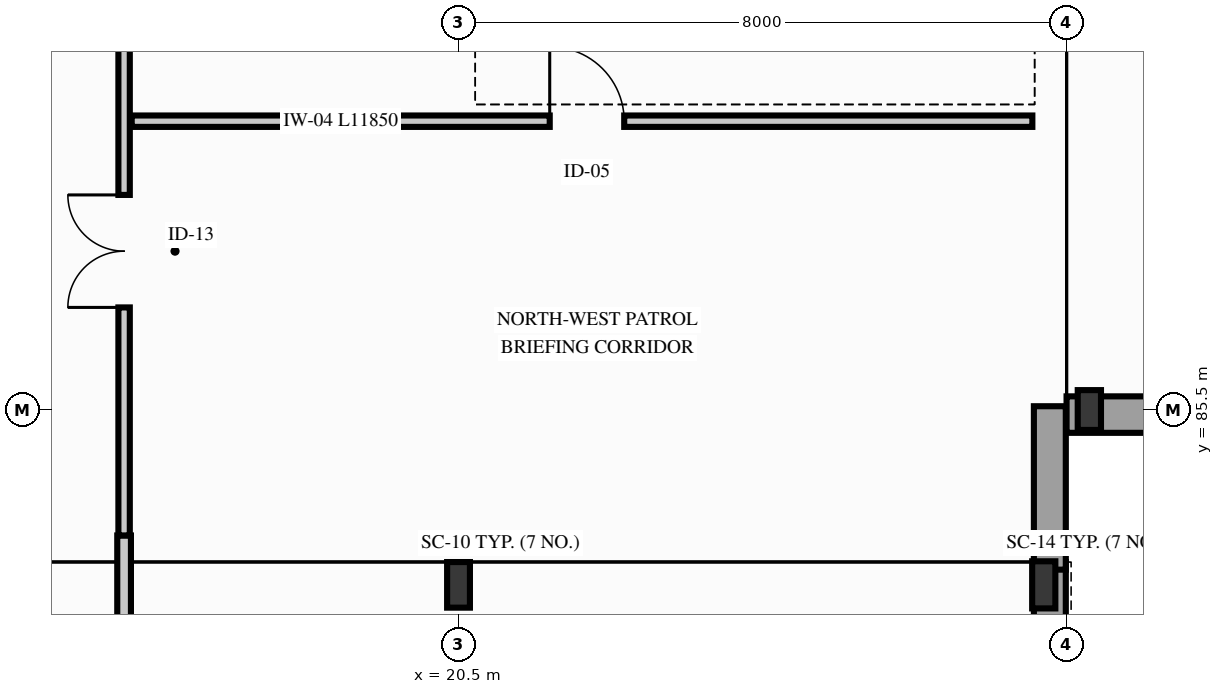
"""IFC4 building model, lengths in metres.
Left out: names, types, materials, properties, quantities, classifications, styles, units other than length and angle.
Written with IfcOpenShell. Run it as: python <this file> out.ifc"""

import sys

from ifc_helpers import new_model, si_unit, direction, frame, frame_2d, origin, origin_2d, place, context, subcontext, project, spatial, rectangle, i_section, extrude, element, fill, save


model = new_model("IFC4")
c1 = context("Model", 3, precision=1e-05, world=origin(), true_north=direction((0.0, 1.0)))
c2 = subcontext(c1, "Body", "Model", "MODEL_VIEW")
j1 = project(units=[si_unit("LENGTHUNIT", "METRE"), si_unit("PLANEANGLEUNIT", "RADIAN")], contexts=[c1])
p1 = place(None, origin())
s1 = spatial("IfcSite", under=j1, at=p1, CompositionType="ELEMENT")
p2 = place(p1, origin())
s2 = spatial("IfcBuilding", under=s1, at=p2, CompositionType="ELEMENT")
p3 = place(p2, frame((0.0, 0.0, 5.1)))
s3 = spatial("IfcBuildingStorey", under=s2, at=p3, CompositionType="ELEMENT", Elevation=5.1)
p4 = place(p3, frame((20.5, 83.2, 0.0), z_axis=(0.0, 0.0, 1.0), x_axis=(1.0, 0.0, 0.0)))
e1 = element("IfcColumn", 1, at=p4, inside=s3, PredefinedType="COLUMN", context=c2, shape_type="SweptSolid", body=[
    extrude(i_section(OverallWidth=0.3, OverallDepth=0.6, WebThickness=0.015, FlangeThickness=0.03, FilletRadius=0.027, at=origin_2d()), origin(), (0.0, 0.0, 1.0), 4.2),
])
p5 = place(p3, frame((28.2, 83.2, 0.0), z_axis=(0.0, 0.0, 1.0), x_axis=(1.0, 0.0, 0.0)))
e2 = element("IfcColumn", 2, at=p5, inside=s3, PredefinedType="COLUMN", context=c2, shape_type="SweptSolid", body=[
    extrude(i_section(OverallWidth=0.305, OverallDepth=0.62, WebThickness=0.021, FlangeThickness=0.04, FilletRadius=0.027, at=origin_2d()), origin(), (0.0, 0.0, 1.0), 4.2),
])
p6 = place(p3, frame((28.8, 85.5, 0.0), z_axis=(0.0, 0.0, 1.0), x_axis=(1.0, 0.0, 0.0)))
e3 = element("IfcColumn", 3, at=p6, inside=s3, PredefinedType="COLUMN", context=c2, shape_type="SweptSolid", body=[
    extrude(i_section(OverallWidth=0.306, OverallDepth=0.524, WebThickness=0.021, FlangeThickness=0.04, FilletRadius=0.027, at=origin_2d()), origin(), (0.0, 0.0, 1.0), 4.2),
])
p7 = place(p3, frame((28.28, 36.5, 0.0), z_axis=(0.0, 0.0, 1.0), x_axis=(0.0, 1.0, 0.0)))
e4 = element("IfcWall", 4, at=p7, inside=s3, PredefinedType="SOLIDWALL", context=c2, shape_type="SweptSolid", body=[
    extrude(rectangle(XDim=47.0, YDim=0.42, at=frame_2d((23.5, 0.0))), origin(), (0.0, 0.0, 1.0), 3.66),
])
p8 = place(p7, frame((1.65, 0.0, 0.74)))
e5 = element("IfcOpeningElement", 5, at=p8, cuts=e4, PredefinedType="OPENING", context=c2, shape_type="SweptSolid", body=[
    extrude(rectangle(XDim=1.6, YDim=2.4, at=frame_2d((0.8, 1.2))), frame((0.0, 0.22, 0.0), z_axis=(0.0, -1.0, 0.0), x_axis=(1.0, 0.0, 0.0)), (0.0, 0.0, 1.0), 0.44),
])
p9 = place(p7, frame((5.75, 0.0, 0.74)))
e6 = element("IfcOpeningElement", 6, at=p9, cuts=e4, PredefinedType="OPENING", context=c2, shape_type="SweptSolid", body=[
    extrude(rectangle(XDim=1.8, YDim=2.4, at=frame_2d((0.9, 1.2))), frame((0.0, 0.22, 0.0), z_axis=(0.0, -1.0, 0.0), x_axis=(1.0, 0.0, 0.0)), (0.0, 0.0, 1.0), 0.44),
])
p10 = place(p7, frame((9.85, 0.0, 0.84)))
e7 = element("IfcOpeningElement", 7, at=p10, cuts=e4, PredefinedType="OPENING", context=c2, shape_type="SweptSolid", body=[
    extrude(rectangle(XDim=1.5, YDim=2.3, at=frame_2d((0.75, 1.15))), frame((0.0, 0.22, 0.0), z_axis=(0.0, -1.0, 0.0), x_axis=(1.0, 0.0, 0.0)), (0.0, 0.0, 1.0), 0.44),
])
p11 = place(p7, frame((13.95, 0.0, 0.85)))
e8 = element("IfcOpeningElement", 8, at=p11, cuts=e4, PredefinedType="OPENING", context=c2, shape_type="SweptSolid", body=[
    extrude(rectangle(XDim=1.4, YDim=2.2, at=frame_2d((0.7, 1.1))), frame((0.0, 0.22, 0.0), z_axis=(0.0, -1.0, 0.0), x_axis=(1.0, 0.0, 0.0)), (0.0, 0.0, 1.0), 0.44),
])
p12 = place(p7, frame((26.25, 0.0, 0.74)))
e9 = element("IfcOpeningElement", 9, at=p12, cuts=e4, PredefinedType="OPENING", context=c2, shape_type="SweptSolid", body=[
    extrude(rectangle(XDim=1.6, YDim=2.4, at=frame_2d((0.8, 1.2))), frame((0.0, 0.22, 0.0), z_axis=(0.0, -1.0, 0.0), x_axis=(1.0, 0.0, 0.0)), (0.0, 0.0, 1.0), 0.44),
])
p13 = place(p7, frame((34.45, 0.0, 0.84)))
e10 = element("IfcOpeningElement", 10, at=p13, cuts=e4, PredefinedType="OPENING", context=c2, shape_type="SweptSolid", body=[
    extrude(rectangle(XDim=1.5, YDim=2.3, at=frame_2d((0.75, 1.15))), frame((0.0, 0.22, 0.0), z_axis=(0.0, -1.0, 0.0), x_axis=(1.0, 0.0, 0.0)), (0.0, 0.0, 1.0), 0.44),
])
p14 = place(p7, frame((42.65, 0.0, 0.54)))
e11 = element("IfcOpeningElement", 11, at=p14, cuts=e4, PredefinedType="OPENING", context=c2, shape_type="SweptSolid", body=[
    extrude(rectangle(XDim=2.2, YDim=2.6, at=frame_2d((1.1, 1.3))), frame((0.0, 0.22, 0.0), z_axis=(0.0, -1.0, 0.0), x_axis=(1.0, 0.0, 0.0)), (0.0, 0.0, 1.0), 0.44),
])
p15 = place(p3, frame((28.28, 83.4, 0.0), z_axis=(0.0, 0.0, 1.0), x_axis=(0.0, 1.0, 0.0)))
e12 = element("IfcWall", 12, at=p15, inside=s3, PredefinedType="SOLIDWALL", context=c2, shape_type="SweptSolid", body=[
    extrude(rectangle(XDim=2.15, YDim=0.42, at=frame_2d((1.075, 0.0))), origin(), (0.0, 0.0, 1.0), 3.94),
])
p16 = place(p3, frame((28.5, 85.44, 0.0), z_axis=(0.0, 0.0, 1.0), x_axis=(1.0, 0.0, 0.0)))
e13 = element("IfcWall", 13, at=p16, inside=s3, PredefinedType="SOLIDWALL", context=c2, shape_type="SweptSolid", body=[
    extrude(rectangle(XDim=55.76, YDim=0.48, at=frame_2d((27.88, 0.0))), origin(), (0.0, 0.0, 1.0), 3.64),
])
p17 = place(p16, frame((54.4, 0.0, 0.0), z_axis=(0.0, 0.0, 1.0), x_axis=(-1.0, 0.0, 0.0)))
e14 = element("IfcOpeningElement", 14, at=p17, cuts=e13, PredefinedType="OPENING", context=c2, shape_type="SweptSolid", body=[
    extrude(rectangle(XDim=1.2, YDim=2.3, at=frame_2d((0.6, 1.15))), frame((0.0, 0.25, 0.0), z_axis=(0.0, -1.0, 0.0), x_axis=(1.0, 0.0, 0.0)), (0.0, 0.0, 1.0), 0.5),
])
p18 = place(p16, frame((1.65, 0.0, 0.94)))
e15 = element("IfcOpeningElement", 15, at=p18, cuts=e13, PredefinedType="OPENING", context=c2, shape_type="SweptSolid", body=[
    extrude(rectangle(XDim=1.4, YDim=2.2, at=frame_2d((0.7, 1.1))), frame((0.0, 0.25, 0.0), z_axis=(0.0, -1.0, 0.0), x_axis=(1.0, 0.0, 0.0)), (0.0, 0.0, 1.0), 0.5),
])
p19 = place(p16, frame((5.85, 0.0, 0.95)))
e16 = element("IfcOpeningElement", 16, at=p19, cuts=e13, PredefinedType="OPENING", context=c2, shape_type="SweptSolid", body=[
    extrude(rectangle(XDim=1.2, YDim=2.1, at=frame_2d((0.6, 1.05))), frame((0.0, 0.25, 0.0), z_axis=(0.0, -1.0, 0.0), x_axis=(1.0, 0.0, 0.0)), (0.0, 0.0, 1.0), 0.5),
])
p20 = place(p16, frame((14.25, 0.0, 0.95)))
e17 = element("IfcOpeningElement", 17, at=p20, cuts=e13, PredefinedType="OPENING", context=c2, shape_type="SweptSolid", body=[
    extrude(rectangle(XDim=1.0, YDim=1.6, at=frame_2d((0.5, 0.8))), frame((0.0, 0.25, 0.0), z_axis=(0.0, -1.0, 0.0), x_axis=(1.0, 0.0, 0.0)), (0.0, 0.0, 1.0), 0.5),
])
p21 = place(p16, frame((22.65, 0.0, 0.95)))
e18 = element("IfcOpeningElement", 18, at=p21, cuts=e13, PredefinedType="OPENING", context=c2, shape_type="SweptSolid", body=[
    extrude(rectangle(XDim=1.2, YDim=2.1, at=frame_2d((0.6, 1.05))), frame((0.0, 0.25, 0.0), z_axis=(0.0, -1.0, 0.0), x_axis=(1.0, 0.0, 0.0)), (0.0, 0.0, 1.0), 0.5),
])
p22 = place(p16, frame((31.05, 0.0, 0.95)))
e19 = element("IfcOpeningElement", 19, at=p22, cuts=e13, PredefinedType="OPENING", context=c2, shape_type="SweptSolid", body=[
    extrude(rectangle(XDim=1.0, YDim=1.6, at=frame_2d((0.5, 0.8))), frame((0.0, 0.25, 0.0), z_axis=(0.0, -1.0, 0.0), x_axis=(1.0, 0.0, 0.0)), (0.0, 0.0, 1.0), 0.5),
])
p23 = place(p16, frame((39.45, 0.0, 0.95)))
e20 = element("IfcOpeningElement", 20, at=p23, cuts=e13, PredefinedType="OPENING", context=c2, shape_type="SweptSolid", body=[
    extrude(rectangle(XDim=1.2, YDim=2.1, at=frame_2d((0.6, 1.05))), frame((0.0, 0.25, 0.0), z_axis=(0.0, -1.0, 0.0), x_axis=(1.0, 0.0, 0.0)), (0.0, 0.0, 1.0), 0.5),
])
p24 = place(p16, frame((47.85, 0.0, 0.95)))
e21 = element("IfcOpeningElement", 21, at=p24, cuts=e13, PredefinedType="OPENING", context=c2, shape_type="SweptSolid", body=[
    extrude(rectangle(XDim=1.0, YDim=1.6, at=frame_2d((0.5, 0.8))), frame((0.0, 0.25, 0.0), z_axis=(0.0, -1.0, 0.0), x_axis=(1.0, 0.0, 0.0)), (0.0, 0.0, 1.0), 0.5),
])
p25 = place(p3, frame((16.1, 72.75, 0.0), z_axis=(0.0, 0.0, 1.0), x_axis=(0.0, 1.0, 0.0)))
e22 = element("IfcWall", 22, at=p25, inside=s3, PredefinedType="PARTITIONING", context=c2, shape_type="SweptSolid", body=[
    extrude(rectangle(XDim=11.1, YDim=0.18, at=frame_2d((5.55, 0.0))), origin(), (0.0, 0.0, 1.0), 3.658),
])
p26 = place(p25, frame((4.5, 0.0, 0.0)))
e23 = element("IfcOpeningElement", 23, at=p26, cuts=e22, PredefinedType="OPENING", context=c2, shape_type="SweptSolid", body=[
    extrude(rectangle(XDim=1.05, YDim=2.2, at=frame_2d((0.525, 1.1))), frame((0.0, 0.1, 0.0), z_axis=(0.0, -1.0, 0.0), x_axis=(1.0, 0.0, 0.0)), (0.0, 0.0, 1.0), 0.2),
])
p27 = place(p3, frame((16.1, 83.85, 0.0), z_axis=(0.0, 0.0, 1.0), x_axis=(0.0, 1.0, 0.0)))
e24 = element("IfcWall", 24, at=p27, inside=s3, PredefinedType="PARTITIONING", context=c2, shape_type="SweptSolid", body=[
    extrude(rectangle(XDim=32.75, YDim=0.15, at=frame_2d((16.375, 0.0))), origin(), (0.0, 0.0, 1.0), 3.92),
])
p28 = place(p27, frame((3.0, 0.0, 0.0)))
e25 = element("IfcOpeningElement", 25, at=p28, cuts=e24, PredefinedType="OPENING", context=c2, shape_type="SweptSolid", body=[
    extrude(rectangle(XDim=1.48, YDim=2.28, at=frame_2d((0.74, 1.14))), frame((0.0, 0.085, 0.0), z_axis=(0.0, -1.0, 0.0), x_axis=(1.0, 0.0, 0.0)), (0.0, 0.0, 1.0), 0.17),
])
p29 = place(p3, frame((16.2, 89.3, 0.0), z_axis=(0.0, 0.0, 1.0), x_axis=(1.0, 0.0, 0.0)))
e26 = element("IfcWall", 26, at=p29, inside=s3, PredefinedType="PARTITIONING", context=c2, shape_type="SweptSolid", body=[
    extrude(rectangle(XDim=11.85, YDim=0.15, at=frame_2d((5.925, 0.0))), origin(), (0.0, 0.0, 1.0), 3.92),
])
p30 = place(p29, frame((5.5, 0.0, 0.0)))
e27 = element("IfcOpeningElement", 27, at=p30, cuts=e26, PredefinedType="OPENING", context=c2, shape_type="SweptSolid", body=[
    extrude(rectangle(XDim=0.98, YDim=2.16, at=frame_2d((0.49, 1.08))), frame((0.0, 0.085, 0.0), z_axis=(0.0, -1.0, 0.0), x_axis=(1.0, 0.0, 0.0)), (0.0, 0.0, 1.0), 0.17),
])
p31 = place(p28, origin())
e28 = element("IfcDoor", 28, at=p31, inside=s3, OperationType="DOUBLE_DOOR_SINGLE_SWING", PredefinedType="DOOR", context=c2, shape_type="SweptSolid", body=[
    extrude(rectangle(XDim=1.48, YDim=2.28, at=frame_2d((0.74, 1.14))), frame((0.0, 0.025, 0.0), z_axis=(0.0, -1.0, 0.0), x_axis=(1.0, 0.0, 0.0)), (0.0, 0.0, 1.0), 0.05),
])
fill(e25, e28)
p32 = place(p30, origin())
e29 = element("IfcDoor", 29, at=p32, inside=s3, OperationType="SINGLE_SWING_LEFT", PredefinedType="DOOR", context=c2, shape_type="SweptSolid", body=[
    extrude(rectangle(XDim=0.98, YDim=2.16, at=frame_2d((0.49, 1.08))), frame((0.0, 0.025, 0.0), z_axis=(0.0, -1.0, 0.0), x_axis=(1.0, 0.0, 0.0)), (0.0, 0.0, 1.0), 0.05),
])
fill(e27, e29)
save(model, sys.argv[1])
